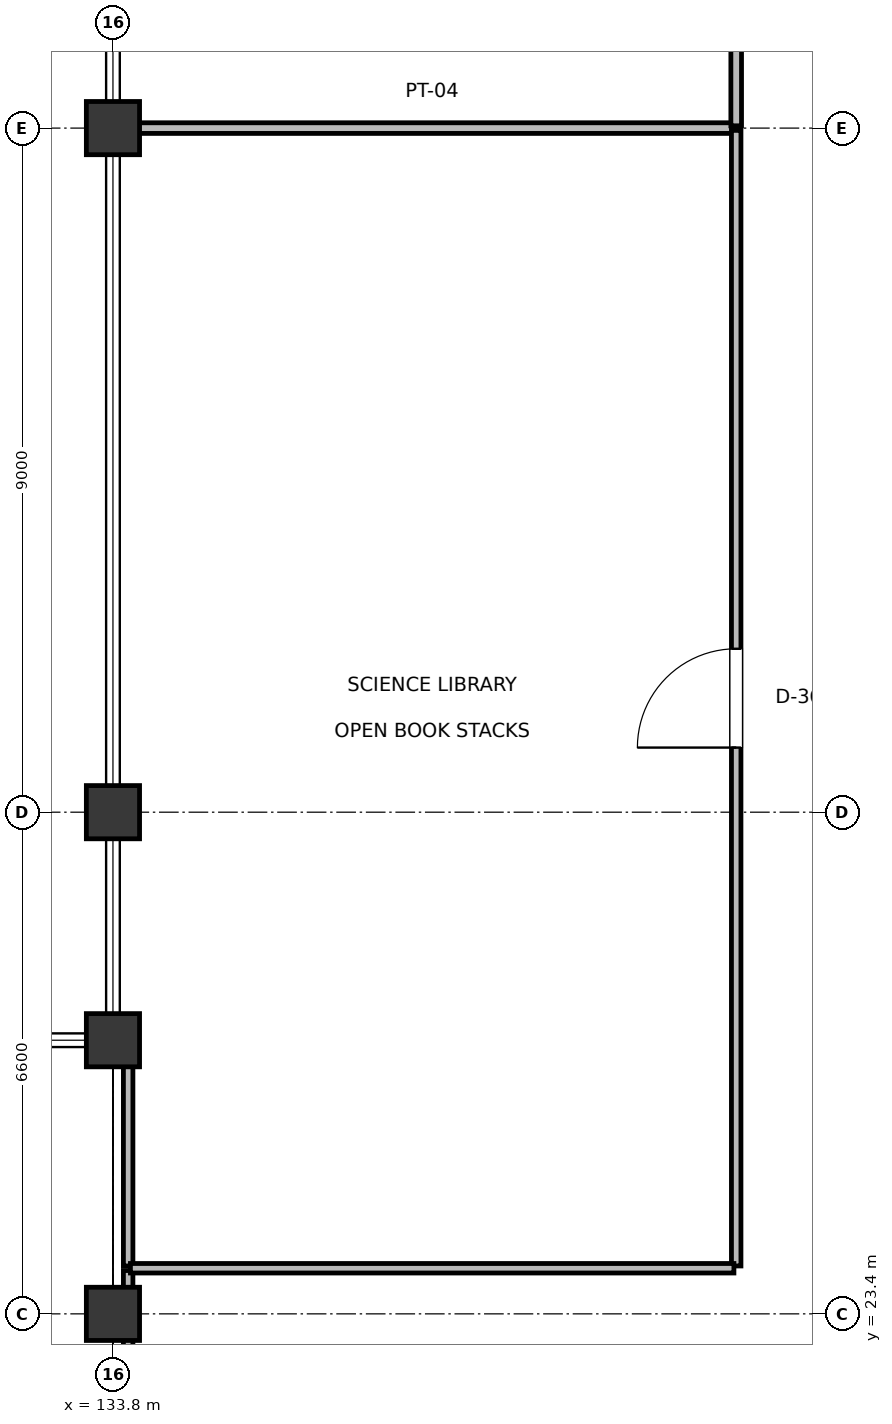
"""IFC4 building model, lengths in metres.
Left out: names, types, materials, properties, quantities, classifications, styles, units other than length and angle.
Written with IfcOpenShell. Run it as: python <this file> out.ifc"""

import sys

from ifc_helpers import new_model, si_unit, direction, frame, frame_2d, origin, origin_2d, place, context, subcontext, project, spatial, rectangle, extrude, element, fill, save


model = new_model("IFC4")
c1 = context("Model", 3, precision=1e-05, world=origin(), true_north=direction((0.0, 1.0)))
c2 = subcontext(c1, "Body", "Model", "MODEL_VIEW")
j1 = project(units=[si_unit("LENGTHUNIT", "METRE"), si_unit("PLANEANGLEUNIT", "RADIAN")], contexts=[c1])
p1 = place(None, origin())
s1 = spatial("IfcSite", under=j1, at=p1, CompositionType="ELEMENT")
p2 = place(p1, origin())
s2 = spatial("IfcBuilding", under=s1, at=p2, CompositionType="ELEMENT")
p3 = place(p2, frame((0.0, 0.0, 10.2)))
s3 = spatial("IfcBuildingStorey", under=s2, at=p3, CompositionType="ELEMENT", Elevation=10.2)
for number, where, z_axis, x_axis in (
    (1, (133.8, 27.0, 0.0), (0.0, 0.0, 1.0), (1.0, 0.0, 0.0)),
    (2, (133.8, 23.4, 0.0), (0.0, 0.0, 1.0), (1.0, 0.0, 0.0)),
    (3, (133.8, 30.0, 0.0), (0.0, 0.0, 1.0), (1.0, 0.0, 0.0)),
    (4, (133.8, 39.0, 0.0), (0.0, 0.0, 1.0), (1.0, 0.0, 0.0)),
):
    element("IfcColumn", number, at=place(p3, frame(where, z_axis=z_axis, x_axis=x_axis)), inside=s3, PredefinedType="COLUMN", context=c2, shape_type="SweptSolid", body=[
        extrude(rectangle(XDim=0.7, YDim=0.7, at=origin_2d()), origin(), (0.0, 0.0, 1.0), 4.8),
    ])
p4 = place(p3, frame((134.0, 24.03, 0.0), z_axis=(0.0, 0.0, 1.0), x_axis=(0.0, 1.0, 0.0)))
e5 = element("IfcWall", 5, at=p4, inside=s3, PredefinedType="PARTITIONING", context=c2, shape_type="SweptSolid", body=[
    extrude(rectangle(XDim=2.74, YDim=0.125, at=frame_2d((1.37, 0.0))), origin(), (0.0, 0.0, 1.0), 4.48),
])
p5 = place(p3, frame((134.0, 21.43, 0.0), z_axis=(0.0, 0.0, 1.0), x_axis=(0.0, 1.0, 0.0)))
e6 = element("IfcWall", 6, at=p5, inside=s3, PredefinedType="PARTITIONING", context=c2, shape_type="SweptSolid", body=[
    extrude(rectangle(XDim=2.54, YDim=0.125, at=frame_2d((1.27, 0.0))), origin(), (0.0, 0.0, 1.0), 3.865),
])
p6 = place(p5, frame((0.41, 0.0, 0.0)))
e7 = element("IfcOpeningElement", 7, at=p6, cuts=e6, PredefinedType="OPENING", context=c2, shape_type="SweptSolid", body=[
    extrude(rectangle(XDim=1.0, YDim=2.15, at=frame_2d((0.5, 1.075))), frame((0.0, 0.073, 0.0), z_axis=(0.0, -1.0, 0.0), x_axis=(1.0, 0.0, 0.0)), (0.0, 0.0, 1.0), 0.145),
])
p7 = place(p3, frame((134.03, 39.0, 0.0), z_axis=(0.0, 0.0, 1.0), x_axis=(1.0, 0.0, 0.0)))
e8 = element("IfcWall", 8, at=p7, inside=s3, PredefinedType="PARTITIONING", context=c2, shape_type="SweptSolid", body=[
    extrude(rectangle(XDim=7.94, YDim=0.14, at=frame_2d((3.97, 0.0))), origin(), (0.0, 0.0, 1.0), 3.715),
])
p8 = place(p3, frame((142.0, 24.03, 0.0), z_axis=(0.0, 0.0, 1.0), x_axis=(0.0, 1.0, 0.0)))
e9 = element("IfcWall", 9, at=p8, inside=s3, PredefinedType="PARTITIONING", context=c2, shape_type="SweptSolid", body=[
    extrude(rectangle(XDim=14.94, YDim=0.125, at=frame_2d((7.47, 0.0))), origin(), (0.0, 0.0, 1.0), 3.655),
])
p9 = place(p8, frame((6.82, 0.0, 0.0)))
e10 = element("IfcOpeningElement", 10, at=p9, cuts=e9, PredefinedType="OPENING", context=c2, shape_type="SweptSolid", body=[
    extrude(rectangle(XDim=1.3, YDim=2.2, at=frame_2d((0.65, 1.1))), frame((0.0, 0.073, 0.0), z_axis=(0.0, -1.0, 0.0), x_axis=(1.0, 0.0, 0.0)), (0.0, 0.0, 1.0), 0.145),
])
p10 = place(p3, frame((134.03, 24.0, 0.0), z_axis=(0.0, 0.0, 1.0), x_axis=(1.0, 0.0, 0.0)))
e11 = element("IfcWall", 11, at=p10, inside=s3, PredefinedType="PARTITIONING", context=c2, shape_type="SweptSolid", body=[
    extrude(rectangle(XDim=7.94, YDim=0.125, at=frame_2d((3.97, 0.0))), origin(), (0.0, 0.0, 1.0), 4.48),
])
p11 = place(p3, frame((142.0, 39.03, 0.0), z_axis=(0.0, 0.0, 1.0), x_axis=(0.0, 1.0, 0.0)))
e12 = element("IfcWall", 12, at=p11, inside=s3, PredefinedType="PARTITIONING", context=c2, shape_type="SweptSolid", body=[
    extrude(rectangle(XDim=36.94, YDim=0.14, at=frame_2d((18.47, 0.0))), origin(), (0.0, 0.0, 1.0), 3.555),
])
p12 = place(p11, frame((17.895, 0.0, 0.0)))
e13 = element("IfcOpeningElement", 13, at=p12, cuts=e12, PredefinedType="OPENING", context=c2, shape_type="SweptSolid", body=[
    extrude(rectangle(XDim=1.15, YDim=2.15, at=frame_2d((0.575, 1.075))), frame((0.0, 0.08, 0.0), z_axis=(0.0, -1.0, 0.0), x_axis=(1.0, 0.0, 0.0)), (0.0, 0.0, 1.0), 0.16),
])
p13 = place(p9, origin())
e14 = element("IfcDoor", 14, at=p13, inside=s3, OperationType="SINGLE_SWING_LEFT", PredefinedType="DOOR", context=c2, shape_type="SweptSolid", body=[
    extrude(rectangle(XDim=1.3, YDim=2.2, at=frame_2d((0.65, 1.1))), frame((0.0, 0.025, 0.0), z_axis=(0.0, -1.0, 0.0), x_axis=(1.0, 0.0, 0.0)), (0.0, 0.0, 1.0), 0.05),
])
fill(e10, e14)
save(model, sys.argv[1])
